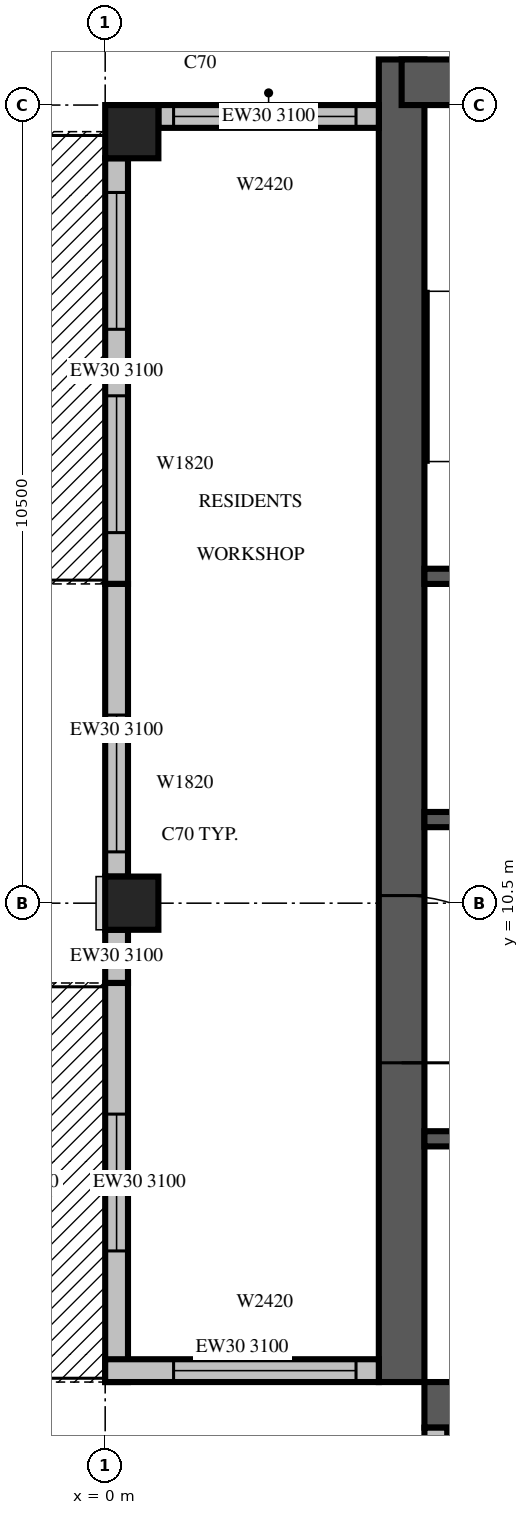
"""IFC4 building model, lengths in metres.
Left out: names, types, materials, properties, quantities, classifications, styles, units other than length and angle.
Written with IfcOpenShell. Run it as: python <this file> out.ifc"""

import sys

from ifc_helpers import new_model, si_unit, direction, frame, frame_2d, origin, origin_2d, place, context, subcontext, project, spatial, rectangle, extrude, source, transform, mapped, element, fill, save


model = new_model("IFC4")
c1 = context("Model", 3, precision=1e-05, world=origin(), true_north=direction((0.0, 1.0)))
c2 = subcontext(c1, "Body", "Model", "MODEL_VIEW")
j1 = project(units=[si_unit("LENGTHUNIT", "METRE"), si_unit("PLANEANGLEUNIT", "RADIAN")], contexts=[c1])
p1 = place(None, origin())
s1 = spatial("IfcSite", under=j1, at=p1, CompositionType="ELEMENT")
p2 = place(p1, origin())
s2 = spatial("IfcBuilding", under=s1, at=p2, CompositionType="ELEMENT")
p3 = place(p2, frame((0.0, 0.0, 319.5)))
s3 = spatial("IfcBuildingStorey", under=s2, at=p3, CompositionType="ELEMENT", Elevation=319.5)
m1 = source(origin(), c2, "Body", "SweptSolid", [
    extrude(rectangle(XDim=0.7, YDim=0.7, at=origin_2d()), origin(), (0.0, 0.0, 1.0), 3.5),
])
for number, where, z_axis, x_axis in (
    (1, (0.35, 10.5, 0.0), (0.0, 0.0, 1.0), (1.0, 0.0, 0.0)),
    (2, (0.35, 20.65, 0.0), (0.0, 0.0, 1.0), (1.0, 0.0, 0.0)),
):
    element("IfcColumn", number, at=place(p3, frame(where, z_axis=z_axis, x_axis=x_axis)), inside=s3, PredefinedType="COLUMN", context=c2, shape_type="MappedRepresentation", body=[
        mapped(m1, transform((0.0, 0.0, 0.0), scale=1.0)),
    ])
m2 = source(origin(), c2, "Body", "SweptSolid", [
    extrude(rectangle(XDim=17.4, YDim=0.6, at=frame_2d((8.7, 0.0))), origin(), (0.0, 0.0, 1.0), 3.5),
])
p4 = place(p3, frame((3.9, 4.2, 0.0), z_axis=(0.0, 0.0, 1.0), x_axis=(0.0, 1.0, 0.0)))
e3 = element("IfcWall", 3, at=p4, inside=s3, PredefinedType="SHEAR", context=c2, shape_type="MappedRepresentation", body=[
    mapped(m2, transform((0.0, 0.0, 0.0), scale=1.0)),
])
m3 = source(origin(), c2, "Body", "SweptSolid", [
    extrude(rectangle(XDim=2.2, YDim=2.1, at=frame_2d((1.1, 1.05))), frame((0.0, 0.31, 0.0), z_axis=(0.0, -1.0, 0.0), x_axis=(1.0, 0.0, 0.0)), (0.0, 0.0, 1.0), 0.62),
])
p5 = place(p4, frame((4.2, 0.0, 0.0)))
e4 = element("IfcOpeningElement", 4, at=p5, cuts=e3, PredefinedType="OPENING", context=c2, shape_type="MappedRepresentation", body=[
    mapped(m3, transform((0.0, 0.0, 0.0), scale=1.0)),
])
p6 = place(p3, frame((4.2, 3.9, 0.0), z_axis=(0.0, 0.0, 1.0), x_axis=(1.0, 0.0, 0.0)))
e5 = element("IfcWall", 5, at=p6, inside=s3, PredefinedType="SHEAR", context=c2, shape_type="MappedRepresentation", body=[
    mapped(m2, transform((0.0, 0.0, 0.0), scale=1.0)),
])
m4 = source(origin(), c2, "Body", "SweptSolid", [
    extrude(rectangle(XDim=0.9, YDim=2.1, at=frame_2d((0.45, 1.05))), frame((0.0, 0.31, 0.0), z_axis=(0.0, -1.0, 0.0), x_axis=(1.0, 0.0, 0.0)), (0.0, 0.0, 1.0), 0.62),
])
p7 = place(p6, frame((14.0, 0.0, 0.0)))
e6 = element("IfcOpeningElement", 6, at=p7, cuts=e5, PredefinedType="OPENING", context=c2, shape_type="MappedRepresentation", body=[
    mapped(m4, transform((0.0, 0.0, 0.0), scale=1.0)),
])
m5 = source(origin(), c2, "Body", "SweptSolid", [
    extrude(rectangle(XDim=6.6, YDim=0.6, at=frame_2d((3.3, 0.0))), origin(), (0.0, 0.0, 1.0), 3.5),
])
p8 = place(p3, frame((3.9, 21.3, 0.0), z_axis=(0.0, 0.0, 1.0), x_axis=(1.0, 0.0, 0.0)))
e7 = element("IfcWall", 7, at=p8, inside=s3, PredefinedType="SHEAR", context=c2, shape_type="MappedRepresentation", body=[
    mapped(m5, transform((0.0, 0.0, 0.0), scale=1.0)),
])
m6 = source(origin(), c2, "Body", "SweptSolid", [
    extrude(rectangle(XDim=1.2, YDim=2.4, at=frame_2d((0.6, 1.2))), frame((0.0, 0.31, 0.0), z_axis=(0.0, -1.0, 0.0), x_axis=(1.0, 0.0, 0.0)), (0.0, 0.0, 1.0), 0.62),
])
p9 = place(p8, frame((1.5, 0.0, 0.6)))
e8 = element("IfcOpeningElement", 8, at=p9, cuts=e7, PredefinedType="OPENING", context=c2, shape_type="MappedRepresentation", body=[
    mapped(m6, transform((0.0, 0.0, 0.0), scale=1.0)),
])
p10 = place(p8, frame((3.6, 0.0, 0.6)))
e9 = element("IfcOpeningElement", 9, at=p10, cuts=e7, PredefinedType="OPENING", context=c2, shape_type="MappedRepresentation", body=[
    mapped(m6, transform((0.0, 0.0, 0.0), scale=1.0)),
])
m7 = source(origin(), c2, "Body", "SweptSolid", [
    extrude(rectangle(XDim=2.9, YDim=0.3, at=frame_2d((1.45, 0.0))), origin(), (0.0, 0.0, 1.0), 3.1),
])
p11 = place(p3, frame((3.6, 20.85, 0.0), z_axis=(0.0, 0.0, 1.0), x_axis=(-1.0, 0.0, 0.0)))
e10 = element("IfcWall", 10, at=p11, inside=s3, PredefinedType="STANDARD", context=c2, shape_type="MappedRepresentation", body=[
    mapped(m7, transform((0.0, 0.0, 0.0), scale=1.0)),
])
m8 = source(origin(), c2, "Body", "SweptSolid", [
    extrude(rectangle(XDim=2.4, YDim=2.0, at=frame_2d((1.2, 1.0))), frame((0.0, 0.16, 0.0), z_axis=(0.0, -1.0, 0.0), x_axis=(1.0, 0.0, 0.0)), (0.0, 0.0, 1.0), 0.32),
])
p12 = place(p11, frame((0.3, 0.0, 0.6)))
e11 = element("IfcOpeningElement", 11, at=p12, cuts=e10, PredefinedType="OPENING", context=c2, shape_type="MappedRepresentation", body=[
    mapped(m8, transform((0.0, 0.0, 0.0), scale=1.0)),
])
m9 = source(origin(), c2, "Body", "SweptSolid", [
    extrude(rectangle(XDim=5.6, YDim=0.3, at=frame_2d((2.8, 0.0))), origin(), (0.0, 0.0, 1.0), 3.1),
])
p13 = place(p3, frame((0.15, 20.3, 0.0), z_axis=(0.0, 0.0, 1.0), x_axis=(0.0, -1.0, 0.0)))
e12 = element("IfcWall", 12, at=p13, inside=s3, PredefinedType="STANDARD", context=c2, shape_type="MappedRepresentation", body=[
    mapped(m9, transform((0.0, 0.0, 0.0), scale=1.0)),
])
m10 = source(origin(), c2, "Body", "SweptSolid", [
    extrude(rectangle(XDim=1.8, YDim=2.4, at=frame_2d((0.9, 1.2))), frame((0.0, 0.16, 0.0), z_axis=(0.0, -1.0, 0.0), x_axis=(1.0, 0.0, 0.0)), (0.0, 0.0, 1.0), 0.32),
])
p14 = place(p13, frame((0.45, 0.0, 0.0)))
e13 = element("IfcOpeningElement", 13, at=p14, cuts=e12, PredefinedType="OPENING", context=c2, shape_type="MappedRepresentation", body=[
    mapped(m10, transform((0.0, 0.0, 0.0), scale=1.0)),
])
m11 = source(origin(), c2, "Body", "SweptSolid", [
    extrude(rectangle(XDim=1.8, YDim=2.0, at=frame_2d((0.9, 1.0))), frame((0.0, 0.16, 0.0), z_axis=(0.0, -1.0, 0.0), x_axis=(1.0, 0.0, 0.0)), (0.0, 0.0, 1.0), 0.32),
])
p15 = place(p13, frame((3.125, 0.0, 0.6)))
e14 = element("IfcOpeningElement", 14, at=p15, cuts=e12, PredefinedType="OPENING", context=c2, shape_type="MappedRepresentation", body=[
    mapped(m11, transform((0.0, 0.0, 0.0), scale=1.0)),
])
m12 = source(origin(), c2, "Body", "SweptSolid", [
    extrude(rectangle(XDim=3.85, YDim=0.3, at=frame_2d((1.925, 0.0))), origin(), (0.0, 0.0, 1.0), 3.1),
])
p16 = place(p3, frame((0.15, 14.7, 0.0), z_axis=(0.0, 0.0, 1.0), x_axis=(0.0, -1.0, 0.0)))
e15 = element("IfcWall", 15, at=p16, inside=s3, PredefinedType="STANDARD", context=c2, shape_type="MappedRepresentation", body=[
    mapped(m12, transform((0.0, 0.0, 0.0), scale=1.0)),
])
p17 = place(p16, frame((1.725, 0.0, 0.6)))
e16 = element("IfcOpeningElement", 16, at=p17, cuts=e15, PredefinedType="OPENING", context=c2, shape_type="MappedRepresentation", body=[
    mapped(m11, transform((0.0, 0.0, 0.0), scale=1.0)),
])
m13 = source(origin(), c2, "Body", "SweptSolid", [
    extrude(rectangle(XDim=0.7, YDim=0.3, at=frame_2d((0.35, 0.0))), origin(), (0.0, 0.0, 1.0), 3.1),
])
p18 = place(p3, frame((0.15, 10.15, 0.0), z_axis=(0.0, 0.0, 1.0), x_axis=(0.0, -1.0, 0.0)))
e17 = element("IfcWall", 17, at=p18, inside=s3, PredefinedType="STANDARD", context=c2, shape_type="MappedRepresentation", body=[
    mapped(m13, transform((0.0, 0.0, 0.0), scale=1.0)),
])
m14 = source(origin(), c2, "Body", "SweptSolid", [
    extrude(rectangle(XDim=5.25, YDim=0.3, at=frame_2d((2.625, 0.0))), origin(), (0.0, 0.0, 1.0), 3.1),
])
p19 = place(p3, frame((0.15, 9.45, 0.0), z_axis=(0.0, 0.0, 1.0), x_axis=(0.0, -1.0, 0.0)))
e18 = element("IfcWall", 18, at=p19, inside=s3, PredefinedType="STANDARD", context=c2, shape_type="MappedRepresentation", body=[
    mapped(m14, transform((0.0, 0.0, 0.0), scale=1.0)),
])
p20 = place(p19, frame((1.725, 0.0, 0.0)))
e19 = element("IfcOpeningElement", 19, at=p20, cuts=e18, PredefinedType="OPENING", context=c2, shape_type="MappedRepresentation", body=[
    mapped(m10, transform((0.0, 0.0, 0.0), scale=1.0)),
])
m15 = source(origin(), c2, "Body", "SweptSolid", [
    extrude(rectangle(XDim=3.6, YDim=0.3, at=frame_2d((1.8, 0.0))), origin(), (0.0, 0.0, 1.0), 3.1),
])
p21 = place(p3, frame((0.0, 4.35, 0.0), z_axis=(0.0, 0.0, 1.0), x_axis=(1.0, 0.0, 0.0)))
e20 = element("IfcWall", 20, at=p21, inside=s3, PredefinedType="STANDARD", context=c2, shape_type="MappedRepresentation", body=[
    mapped(m15, transform((0.0, 0.0, 0.0), scale=1.0)),
])
p22 = place(p21, frame((0.9, 0.0, 0.6)))
e21 = element("IfcOpeningElement", 21, at=p22, cuts=e20, PredefinedType="OPENING", context=c2, shape_type="MappedRepresentation", body=[
    mapped(m8, transform((0.0, 0.0, 0.0), scale=1.0)),
])
p23 = place(p3, frame((4.35, 3.6, 0.0), z_axis=(0.0, 0.0, 1.0), x_axis=(0.0, -1.0, 0.0)))
e22 = element("IfcWall", 22, at=p23, inside=s3, PredefinedType="STANDARD", context=c2, shape_type="MappedRepresentation", body=[
    mapped(m15, transform((0.0, 0.0, 0.0), scale=1.0)),
])
p24 = place(p23, frame((0.3, 0.0, 0.6)))
e23 = element("IfcOpeningElement", 23, at=p24, cuts=e22, PredefinedType="OPENING", context=c2, shape_type="MappedRepresentation", body=[
    mapped(m8, transform((0.0, 0.0, 0.0), scale=1.0)),
])
m16 = source(origin(), c2, "Body", "SweptSolid", [
    extrude(rectangle(XDim=9.6, YDim=0.2, at=frame_2d((4.8, 0.0))), origin(), (0.0, 0.0, 1.0), 3.5),
])
p25 = place(p3, frame((4.2, 7.4, 0.0), z_axis=(0.0, 0.0, 1.0), x_axis=(1.0, 0.0, 0.0)))
e24 = element("IfcWall", 24, at=p25, inside=s3, PredefinedType="SOLIDWALL", context=c2, shape_type="MappedRepresentation", body=[
    mapped(m16, transform((0.0, 0.0, 0.0), scale=1.0)),
])
m17 = source(origin(), c2, "Body", "SweptSolid", [
    extrude(rectangle(XDim=1.1, YDim=2.1, at=frame_2d((0.55, 1.05))), frame((0.0, 0.11, 0.0), z_axis=(0.0, -1.0, 0.0), x_axis=(1.0, 0.0, 0.0)), (0.0, 0.0, 1.0), 0.22),
])
p26 = place(p25, frame((0.65, 0.0, 0.0)))
e25 = element("IfcOpeningElement", 25, at=p26, cuts=e24, PredefinedType="OPENING", context=c2, shape_type="MappedRepresentation", body=[
    mapped(m17, transform((0.0, 0.0, 0.0), scale=1.0)),
])
p27 = place(p25, frame((3.05, 0.0, 0.0)))
e26 = element("IfcOpeningElement", 26, at=p27, cuts=e24, PredefinedType="OPENING", context=c2, shape_type="MappedRepresentation", body=[
    mapped(m17, transform((0.0, 0.0, 0.0), scale=1.0)),
])
p28 = place(p25, frame((5.45, 0.0, 0.0)))
e27 = element("IfcOpeningElement", 27, at=p28, cuts=e24, PredefinedType="OPENING", context=c2, shape_type="MappedRepresentation", body=[
    mapped(m17, transform((0.0, 0.0, 0.0), scale=1.0)),
])
p29 = place(p25, frame((7.85, 0.0, 0.0)))
e28 = element("IfcOpeningElement", 28, at=p29, cuts=e24, PredefinedType="OPENING", context=c2, shape_type="MappedRepresentation", body=[
    mapped(m17, transform((0.0, 0.0, 0.0), scale=1.0)),
])
m18 = source(origin(), c2, "Body", "SweptSolid", [
    extrude(rectangle(XDim=4.8, YDim=0.2, at=frame_2d((2.4, 0.0))), origin(), (0.0, 0.0, 1.0), 3.5),
])
p30 = place(p3, frame((4.2, 11.6, 0.0), z_axis=(0.0, 0.0, 1.0), x_axis=(1.0, 0.0, 0.0)))
e29 = element("IfcWall", 29, at=p30, inside=s3, PredefinedType="SOLIDWALL", context=c2, shape_type="MappedRepresentation", body=[
    mapped(m18, transform((0.0, 0.0, 0.0), scale=1.0)),
])
p31 = place(p30, frame((0.65, 0.0, 0.0)))
e30 = element("IfcOpeningElement", 30, at=p31, cuts=e29, PredefinedType="OPENING", context=c2, shape_type="MappedRepresentation", body=[
    mapped(m17, transform((0.0, 0.0, 0.0), scale=1.0)),
])
p32 = place(p30, frame((3.05, 0.0, 0.0)))
e31 = element("IfcOpeningElement", 31, at=p32, cuts=e29, PredefinedType="OPENING", context=c2, shape_type="MappedRepresentation", body=[
    mapped(m17, transform((0.0, 0.0, 0.0), scale=1.0)),
])
p33 = place(p3, frame((4.2, 14.8, 0.0), z_axis=(0.0, 0.0, 1.0), x_axis=(1.0, 0.0, 0.0)))
e32 = element("IfcWall", 32, at=p33, inside=s3, PredefinedType="SOLIDWALL", context=c2, shape_type="MappedRepresentation", body=[
    mapped(m18, transform((0.0, 0.0, 0.0), scale=1.0)),
])
m19 = source(origin(), c2, "Body", "SweptSolid", [
    extrude(rectangle(XDim=2.4, YDim=2.0, at=frame_2d((1.2, 1.0))), frame((0.0, 0.03, 0.0), z_axis=(0.0, -1.0, 0.0), x_axis=(1.0, 0.0, 0.0)), (0.0, 0.0, 1.0), 0.06),
])
p34 = place(p12, origin())
e33 = element("IfcWindow", 33, at=p34, inside=s3, PartitioningType="SINGLE_PANEL", PredefinedType="WINDOW", context=c2, shape_type="MappedRepresentation", body=[
    mapped(m19, transform((0.0, 0.0, 0.0), scale=1.0)),
])
fill(e11, e33)
m20 = source(origin(), c2, "Body", "SweptSolid", [
    extrude(rectangle(XDim=1.8, YDim=2.4, at=frame_2d((0.9, 1.2))), frame((0.0, 0.025, 0.0), z_axis=(0.0, -1.0, 0.0), x_axis=(1.0, 0.0, 0.0)), (0.0, 0.0, 1.0), 0.05),
])
p35 = place(p14, origin())
e34 = element("IfcDoor", 34, at=p35, inside=s3, OperationType="SLIDING_TO_LEFT", PredefinedType="DOOR", context=c2, shape_type="MappedRepresentation", body=[
    mapped(m20, transform((0.0, 0.0, 0.0), scale=1.0)),
])
fill(e13, e34)
m21 = source(origin(), c2, "Body", "SweptSolid", [
    extrude(rectangle(XDim=1.8, YDim=2.0, at=frame_2d((0.9, 1.0))), frame((0.0, 0.03, 0.0), z_axis=(0.0, -1.0, 0.0), x_axis=(1.0, 0.0, 0.0)), (0.0, 0.0, 1.0), 0.06),
])
p36 = place(p15, origin())
e35 = element("IfcWindow", 35, at=p36, inside=s3, PartitioningType="SINGLE_PANEL", PredefinedType="WINDOW", context=c2, shape_type="MappedRepresentation", body=[
    mapped(m21, transform((0.0, 0.0, 0.0), scale=1.0)),
])
fill(e14, e35)
p37 = place(p17, origin())
e36 = element("IfcWindow", 36, at=p37, inside=s3, PartitioningType="SINGLE_PANEL", PredefinedType="WINDOW", context=c2, shape_type="MappedRepresentation", body=[
    mapped(m21, transform((0.0, 0.0, 0.0), scale=1.0)),
])
fill(e16, e36)
p38 = place(p20, origin())
e37 = element("IfcDoor", 37, at=p38, inside=s3, OperationType="SLIDING_TO_LEFT", PredefinedType="DOOR", context=c2, shape_type="MappedRepresentation", body=[
    mapped(m20, transform((0.0, 0.0, 0.0), scale=1.0)),
])
fill(e19, e37)
p39 = place(p22, origin())
e38 = element("IfcWindow", 38, at=p39, inside=s3, PartitioningType="SINGLE_PANEL", PredefinedType="WINDOW", context=c2, shape_type="MappedRepresentation", body=[
    mapped(m19, transform((0.0, 0.0, 0.0), scale=1.0)),
])
fill(e21, e38)
m22 = source(origin(), c2, "Body", "SweptSolid", [
    extrude(rectangle(XDim=2.2, YDim=2.1, at=frame_2d((1.1, 1.05))), frame((0.0, 0.025, 0.0), z_axis=(0.0, -1.0, 0.0), x_axis=(1.0, 0.0, 0.0)), (0.0, 0.0, 1.0), 0.05),
])
p40 = place(p5, origin())
e39 = element("IfcDoor", 39, at=p40, inside=s3, OperationType="DOUBLE_DOOR_SINGLE_SWING", PredefinedType="DOOR", context=c2, shape_type="MappedRepresentation", body=[
    mapped(m22, transform((0.0, 0.0, 0.0), scale=1.0)),
])
fill(e4, e39)
save(model, sys.argv[1])
